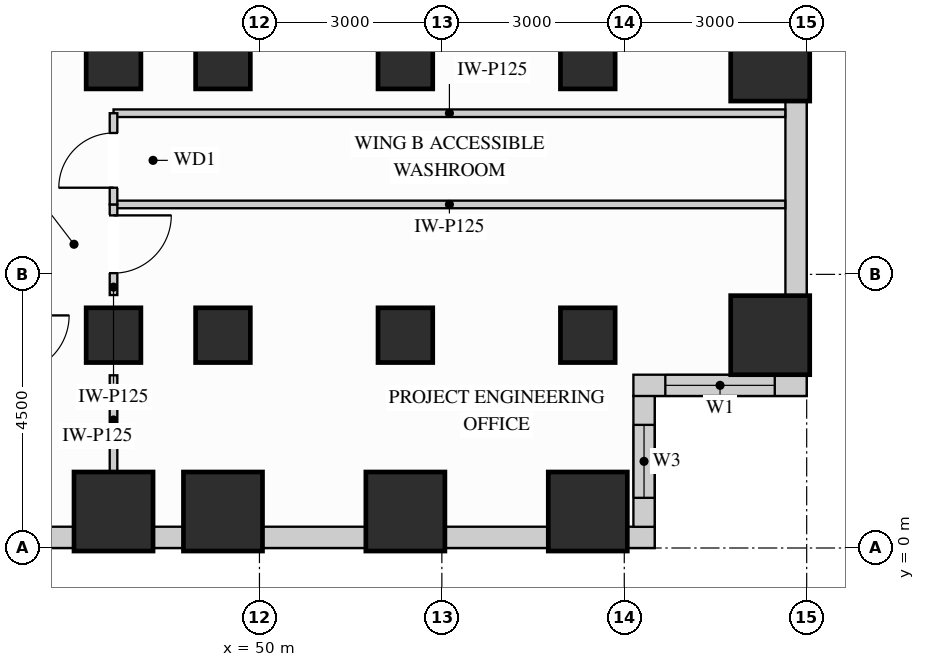
"""IFC4 building model, lengths in metres.
Left out: names, types, materials, properties, quantities, classifications, styles, units other than length and angle.
Written with IfcOpenShell. Run it as: python <this file> out.ifc"""

import sys

from ifc_helpers import new_model, si_unit, direction, frame, frame_2d, origin, origin_2d, place, context, subcontext, project, spatial, rectangle, extrude, source, transform, mapped, element, fill, save


model = new_model("IFC4")
c1 = context("Model", 3, precision=1e-05, world=origin(), true_north=direction((0.0, 1.0)))
c2 = subcontext(c1, "Body", "Model", "MODEL_VIEW")
j1 = project(units=[si_unit("LENGTHUNIT", "METRE"), si_unit("PLANEANGLEUNIT", "RADIAN")], contexts=[c1])
p1 = place(None, origin())
s1 = spatial("IfcSite", under=j1, at=p1, CompositionType="ELEMENT")
p2 = place(p1, origin())
s2 = spatial("IfcBuilding", under=s1, at=p2, CompositionType="ELEMENT")
p3 = place(p2, frame((0.0, 0.0, 65.7)))
s3 = spatial("IfcBuildingStorey", under=s2, at=p3, CompositionType="ELEMENT", Elevation=65.7)
m1 = source(origin(), c2, "Body", "SweptSolid", [
    extrude(rectangle(XDim=0.9, YDim=0.9, at=origin_2d()), origin(), (0.0, 0.0, 1.0), 3.38),
])
for number, where, z_axis, x_axis in (
    (1, (47.6, 3.5, 0.0), (0.0, 0.0, 1.0), (1.0, 0.0, 0.0)),
    (2, (47.6, 8.0, 0.0), (0.0, 0.0, 1.0), (1.0, 0.0, 0.0)),
    (3, (49.4, 3.5, 0.0), (0.0, 0.0, 1.0), (1.0, 0.0, 0.0)),
    (4, (49.4, 8.0, 0.0), (0.0, 0.0, 1.0), (1.0, 0.0, 0.0)),
    (5, (52.4, 3.5, 0.0), (0.0, 0.0, 1.0), (1.0, 0.0, 0.0)),
    (6, (52.4, 8.0, 0.0), (0.0, 0.0, 1.0), (1.0, 0.0, 0.0)),
    (7, (55.4, 3.5, 0.0), (0.0, 0.0, 1.0), (1.0, 0.0, 0.0)),
    (8, (55.4, 8.0, 0.0), (0.0, 0.0, 1.0), (1.0, 0.0, 0.0)),
):
    element("IfcColumn", number, at=place(p3, frame(where, z_axis=z_axis, x_axis=x_axis)), inside=s3, PredefinedType="COLUMN", context=c2, shape_type="MappedRepresentation", body=[
        mapped(m1, transform((0.0, 0.0, 0.0), x_axis=(1.0, 0.0, 0.0), y_axis=(0.0, 1.0, 0.0), z_axis=(0.0, 0.0, 1.0))),
    ])
m2 = source(origin(), c2, "Body", "SweptSolid", [
    extrude(rectangle(XDim=1.3, YDim=1.3, at=origin_2d()), origin(), (0.0, 0.0, 1.0), 3.38),
])
for number, where, z_axis, x_axis in (
    (9, (58.4, 3.5, 0.0), (0.0, 0.0, 1.0), (1.0, 0.0, 0.0)),
    (10, (58.4, 8.0, 0.0), (0.0, 0.0, 1.0), (1.0, 0.0, 0.0)),
    (11, (47.6, 0.6, 0.0), (0.0, 0.0, 1.0), (1.0, 0.0, 0.0)),
    (12, (49.4, 0.6, 0.0), (0.0, 0.0, 1.0), (1.0, 0.0, 0.0)),
    (13, (52.4, 0.6, 0.0), (0.0, 0.0, 1.0), (1.0, 0.0, 0.0)),
    (14, (55.4, 0.6, 0.0), (0.0, 0.0, 1.0), (1.0, 0.0, 0.0)),
):
    element("IfcColumn", number, at=place(p3, frame(where, z_axis=z_axis, x_axis=x_axis)), inside=s3, PredefinedType="COLUMN", context=c2, shape_type="MappedRepresentation", body=[
        mapped(m2, transform((0.0, 0.0, 0.0), x_axis=(1.0, 0.0, 0.0), y_axis=(0.0, 1.0, 0.0), z_axis=(0.0, 0.0, 1.0))),
    ])
p4 = place(p3, frame((40.648, 0.175, 0.0), z_axis=(0.0, 0.0, 1.0), x_axis=(1.0, 0.0, 0.0)))
e15 = element("IfcWall", 15, at=p4, inside=s3, PredefinedType="SOLIDWALL", context=c2, shape_type="SweptSolid", body=[
    extrude(rectangle(XDim=6.304, YDim=0.35, at=frame_2d((3.152, 0.0))), origin(), (0.0, 0.0, 1.0), 2.51),
])
p5 = place(p4, frame((0.687, 0.0, 0.78)))
e16 = element("IfcOpeningElement", 16, at=p5, cuts=e15, PredefinedType="OPENING", context=c2, shape_type="SweptSolid", body=[
    extrude(rectangle(XDim=1.8, YDim=1.55, at=frame_2d((0.9, 0.775))), frame((0.0, 0.185, 0.0), z_axis=(0.0, -1.0, 0.0), x_axis=(1.0, 0.0, 0.0)), (0.0, 0.0, 1.0), 0.37),
])
p6 = place(p4, frame((2.855, 0.0, 0.78)))
e17 = element("IfcOpeningElement", 17, at=p6, cuts=e15, PredefinedType="OPENING", context=c2, shape_type="SweptSolid", body=[
    extrude(rectangle(XDim=1.8, YDim=1.55, at=frame_2d((0.9, 0.775))), frame((0.0, 0.185, 0.0), z_axis=(0.0, -1.0, 0.0), x_axis=(1.0, 0.0, 0.0)), (0.0, 0.0, 1.0), 0.37),
])
m3 = source(origin(), c2, "Body", "SweptSolid", [
    extrude(rectangle(XDim=0.504, YDim=0.35, at=frame_2d((0.252, 0.0))), origin(), (0.0, 0.0, 1.0), 3.365),
])
p7 = place(p3, frame((48.248, 0.175, 0.0), z_axis=(0.0, 0.0, 1.0), x_axis=(1.0, 0.0, 0.0)))
e18 = element("IfcWall", 18, at=p7, inside=s3, PredefinedType="SOLIDWALL", context=c2, shape_type="MappedRepresentation", body=[
    mapped(m3, transform((0.0, 0.0, 0.0), x_axis=(1.0, 0.0, 0.0), y_axis=(0.0, 1.0, 0.0), z_axis=(0.0, 0.0, 1.0))),
])
m4 = source(origin(), c2, "Body", "SweptSolid", [
    extrude(rectangle(XDim=1.704, YDim=0.35, at=frame_2d((0.852, 0.0))), origin(), (0.0, 0.0, 1.0), 2.51),
])
for number, where, z_axis, x_axis in (
    (19, (50.048, 0.175, 0.0), (0.0, 0.0, 1.0), (1.0, 0.0, 0.0)),
    (20, (53.048, 0.175, 0.0), (0.0, 0.0, 1.0), (1.0, 0.0, 0.0)),
):
    element("IfcWall", number, at=place(p3, frame(where, z_axis=z_axis, x_axis=x_axis)), inside=s3, PredefinedType="SOLIDWALL", context=c2, shape_type="MappedRepresentation", body=[
        mapped(m4, transform((0.0, 0.0, 0.0), x_axis=(1.0, 0.0, 0.0), y_axis=(0.0, 1.0, 0.0), z_axis=(0.0, 0.0, 1.0))),
    ])
m5 = source(origin(), c2, "Body", "SweptSolid", [
    extrude(rectangle(XDim=0.452, YDim=0.35, at=frame_2d((0.226, 0.0))), origin(), (0.0, 0.0, 1.0), 3.365),
])
p8 = place(p3, frame((56.048, 0.175, 0.0), z_axis=(0.0, 0.0, 1.0), x_axis=(1.0, 0.0, 0.0)))
e21 = element("IfcWall", 21, at=p8, inside=s3, PredefinedType="SOLIDWALL", context=c2, shape_type="MappedRepresentation", body=[
    mapped(m5, transform((0.0, 0.0, 0.0), x_axis=(1.0, 0.0, 0.0), y_axis=(0.0, 1.0, 0.0), z_axis=(0.0, 0.0, 1.0))),
])
p9 = place(p3, frame((56.325, 0.348, 0.0), z_axis=(0.0, 0.0, 1.0), x_axis=(0.0, 1.0, 0.0)))
e22 = element("IfcWall", 22, at=p9, inside=s3, PredefinedType="SOLIDWALL", context=c2, shape_type="SweptSolid", body=[
    extrude(rectangle(XDim=2.154, YDim=0.35, at=frame_2d((1.077, 0.0))), origin(), (0.0, 0.0, 1.0), 3.365),
])
p10 = place(p9, frame((0.477, 0.0, 0.78)))
e23 = element("IfcOpeningElement", 23, at=p10, cuts=e22, PredefinedType="OPENING", context=c2, shape_type="SweptSolid", body=[
    extrude(rectangle(XDim=1.2, YDim=2.1, at=frame_2d((0.6, 1.05))), frame((0.0, 0.185, 0.0), z_axis=(0.0, -1.0, 0.0), x_axis=(1.0, 0.0, 0.0)), (0.0, 0.0, 1.0), 0.37),
])
p11 = place(p3, frame((56.15, 2.675, 0.0), z_axis=(0.0, 0.0, 1.0), x_axis=(1.0, 0.0, 0.0)))
e24 = element("IfcWall", 24, at=p11, inside=s3, PredefinedType="SOLIDWALL", context=c2, shape_type="SweptSolid", body=[
    extrude(rectangle(XDim=2.85, YDim=0.35, at=frame_2d((1.425, 0.0))), origin(), (0.0, 0.0, 1.0), 3.365),
])
p12 = place(p11, frame((0.525, 0.0, 0.78)))
e25 = element("IfcOpeningElement", 25, at=p12, cuts=e24, PredefinedType="OPENING", context=c2, shape_type="SweptSolid", body=[
    extrude(rectangle(XDim=1.8, YDim=2.1, at=frame_2d((0.9, 1.05))), frame((0.0, 0.185, 0.0), z_axis=(0.0, -1.0, 0.0), x_axis=(1.0, 0.0, 0.0)), (0.0, 0.0, 1.0), 0.37),
])
m6 = source(origin(), c2, "Body", "SweptSolid", [
    extrude(rectangle(XDim=3.204, YDim=0.35, at=frame_2d((1.602, 0.0))), origin(), (0.0, 0.0, 1.0), 2.51),
])
p13 = place(p3, frame((58.825, 4.148, 0.0), z_axis=(0.0, 0.0, 1.0), x_axis=(0.0, 1.0, 0.0)))
e26 = element("IfcWall", 26, at=p13, inside=s3, PredefinedType="SOLIDWALL", context=c2, shape_type="MappedRepresentation", body=[
    mapped(m6, transform((0.0, 0.0, 0.0), x_axis=(1.0, 0.0, 0.0), y_axis=(0.0, 1.0, 0.0), z_axis=(0.0, 0.0, 1.0))),
])
m7 = source(origin(), c2, "Body", "SweptSolid", [
    extrude(rectangle(XDim=11.048, YDim=0.125, at=frame_2d((5.524, 0.0))), origin(), (0.0, 0.0, 1.0), 3.365),
])
for number, where, z_axis, x_axis in (
    (27, (47.6, 5.65, 0.0), (0.0, 0.0, 1.0), (1.0, 0.0, 0.0)),
    (28, (47.6, 7.15, 0.0), (0.0, 0.0, 1.0), (1.0, 0.0, 0.0)),
):
    element("IfcWall", number, at=place(p3, frame(where, z_axis=z_axis, x_axis=x_axis)), inside=s3, PredefinedType="PARTITIONING", context=c2, shape_type="MappedRepresentation", body=[
        mapped(m7, transform((0.0, 0.0, 0.0), x_axis=(1.0, 0.0, 0.0), y_axis=(0.0, 1.0, 0.0), z_axis=(0.0, 0.0, 1.0))),
    ])
p14 = place(p3, frame((47.6, 4.16, 0.0), z_axis=(0.0, 0.0, 1.0), x_axis=(0.0, 1.0, 0.0)))
e29 = element("IfcWall", 29, at=p14, inside=s3, PredefinedType="PARTITIONING", context=c2, shape_type="SweptSolid", body=[
    extrude(rectangle(XDim=1.49, YDim=0.125, at=frame_2d((0.745, 0.0))), origin(), (0.0, 0.0, 1.0), 2.67),
])
p15 = place(p14, frame((0.36, 0.0, 0.0)))
e30 = element("IfcOpeningElement", 30, at=p15, cuts=e29, PredefinedType="OPENING", context=c2, shape_type="SweptSolid", body=[
    extrude(rectangle(XDim=0.95, YDim=2.15, at=frame_2d((0.475, 1.075))), frame((0.0, 0.073, 0.0), z_axis=(0.0, -1.0, 0.0), x_axis=(1.0, 0.0, 0.0)), (0.0, 0.0, 1.0), 0.145),
])
m8 = source(origin(), c2, "Body", "SweptSolid", [
    extrude(rectangle(XDim=1.58, YDim=0.125, at=frame_2d((0.79, 0.0))), origin(), (0.0, 0.0, 1.0), 2.67),
])
p16 = place(p3, frame((47.6, 1.26, 0.0), z_axis=(0.0, 0.0, 1.0), x_axis=(0.0, 1.0, 0.0)))
e31 = element("IfcWall", 31, at=p16, inside=s3, PredefinedType="PARTITIONING", context=c2, shape_type="MappedRepresentation", body=[
    mapped(m8, transform((0.0, 0.0, 0.0), x_axis=(1.0, 0.0, 0.0), y_axis=(0.0, 1.0, 0.0), z_axis=(0.0, 0.0, 1.0))),
])
p17 = place(p3, frame((47.6, 5.65, 0.0), z_axis=(0.0, 0.0, 1.0), x_axis=(0.0, 1.0, 0.0)))
e32 = element("IfcWall", 32, at=p17, inside=s3, PredefinedType="PARTITIONING", context=c2, shape_type="SweptSolid", body=[
    extrude(rectangle(XDim=1.5, YDim=0.125, at=frame_2d((0.75, 0.0))), origin(), (0.0, 0.0, 1.0), 2.67),
])
p18 = place(p17, frame((0.275, 0.0, 0.0)))
e33 = element("IfcOpeningElement", 33, at=p18, cuts=e32, PredefinedType="OPENING", context=c2, shape_type="SweptSolid", body=[
    extrude(rectangle(XDim=0.9, YDim=2.15, at=frame_2d((0.45, 1.075))), frame((0.0, 0.073, 0.0), z_axis=(0.0, -1.0, 0.0), x_axis=(1.0, 0.0, 0.0)), (0.0, 0.0, 1.0), 0.145),
])
m9 = source(origin(), c2, "Body", "SweptSolid", [
    extrude(rectangle(XDim=0.95, YDim=2.15, at=frame_2d((0.475, 1.075))), frame((0.0, 0.025, 0.0), z_axis=(0.0, -1.0, 0.0), x_axis=(1.0, 0.0, 0.0)), (0.0, 0.0, 1.0), 0.05),
])
p19 = place(p15, origin())
e34 = element("IfcDoor", 34, at=p19, inside=s3, OperationType="SINGLE_SWING_RIGHT", PredefinedType="DOOR", context=c2, shape_type="MappedRepresentation", body=[
    mapped(m9, transform((0.0, 0.0, 0.0), x_axis=(1.0, 0.0, 0.0), y_axis=(0.0, 1.0, 0.0), z_axis=(0.0, 0.0, 1.0))),
])
fill(e30, e34)
m10 = source(origin(), c2, "Body", "SweptSolid", [
    extrude(rectangle(XDim=0.9, YDim=2.15, at=frame_2d((0.45, 1.075))), frame((0.0, 0.025, 0.0), z_axis=(0.0, -1.0, 0.0), x_axis=(1.0, 0.0, 0.0)), (0.0, 0.0, 1.0), 0.05),
])
p20 = place(p18, origin())
e35 = element("IfcDoor", 35, at=p20, inside=s3, OperationType="SINGLE_SWING_LEFT", PredefinedType="DOOR", context=c2, shape_type="MappedRepresentation", body=[
    mapped(m10, transform((0.0, 0.0, 0.0), x_axis=(1.0, 0.0, 0.0), y_axis=(0.0, 1.0, 0.0), z_axis=(0.0, 0.0, 1.0))),
])
fill(e33, e35)
m11 = source(origin(), c2, "Body", "SweptSolid", [
    extrude(rectangle(XDim=1.8, YDim=2.1, at=frame_2d((0.9, 1.05))), frame((0.0, 0.03, 0.0), z_axis=(0.0, -1.0, 0.0), x_axis=(1.0, 0.0, 0.0)), (0.0, 0.0, 1.0), 0.06),
])
p21 = place(p12, origin())
e36 = element("IfcWindow", 36, at=p21, inside=s3, PartitioningType="SINGLE_PANEL", PredefinedType="WINDOW", context=c2, shape_type="MappedRepresentation", body=[
    mapped(m11, transform((0.0, 0.0, 0.0), x_axis=(1.0, 0.0, 0.0), y_axis=(0.0, 1.0, 0.0), z_axis=(0.0, 0.0, 1.0))),
])
fill(e25, e36)
m12 = source(origin(), c2, "Body", "SweptSolid", [
    extrude(rectangle(XDim=1.2, YDim=2.1, at=frame_2d((0.6, 1.05))), frame((0.0, 0.03, 0.0), z_axis=(0.0, -1.0, 0.0), x_axis=(1.0, 0.0, 0.0)), (0.0, 0.0, 1.0), 0.06),
])
p22 = place(p10, origin())
e37 = element("IfcWindow", 37, at=p22, inside=s3, PartitioningType="SINGLE_PANEL", PredefinedType="WINDOW", context=c2, shape_type="MappedRepresentation", body=[
    mapped(m12, transform((0.0, 0.0, 0.0), x_axis=(1.0, 0.0, 0.0), y_axis=(0.0, 1.0, 0.0), z_axis=(0.0, 0.0, 1.0))),
])
fill(e23, e37)
save(model, sys.argv[1])
